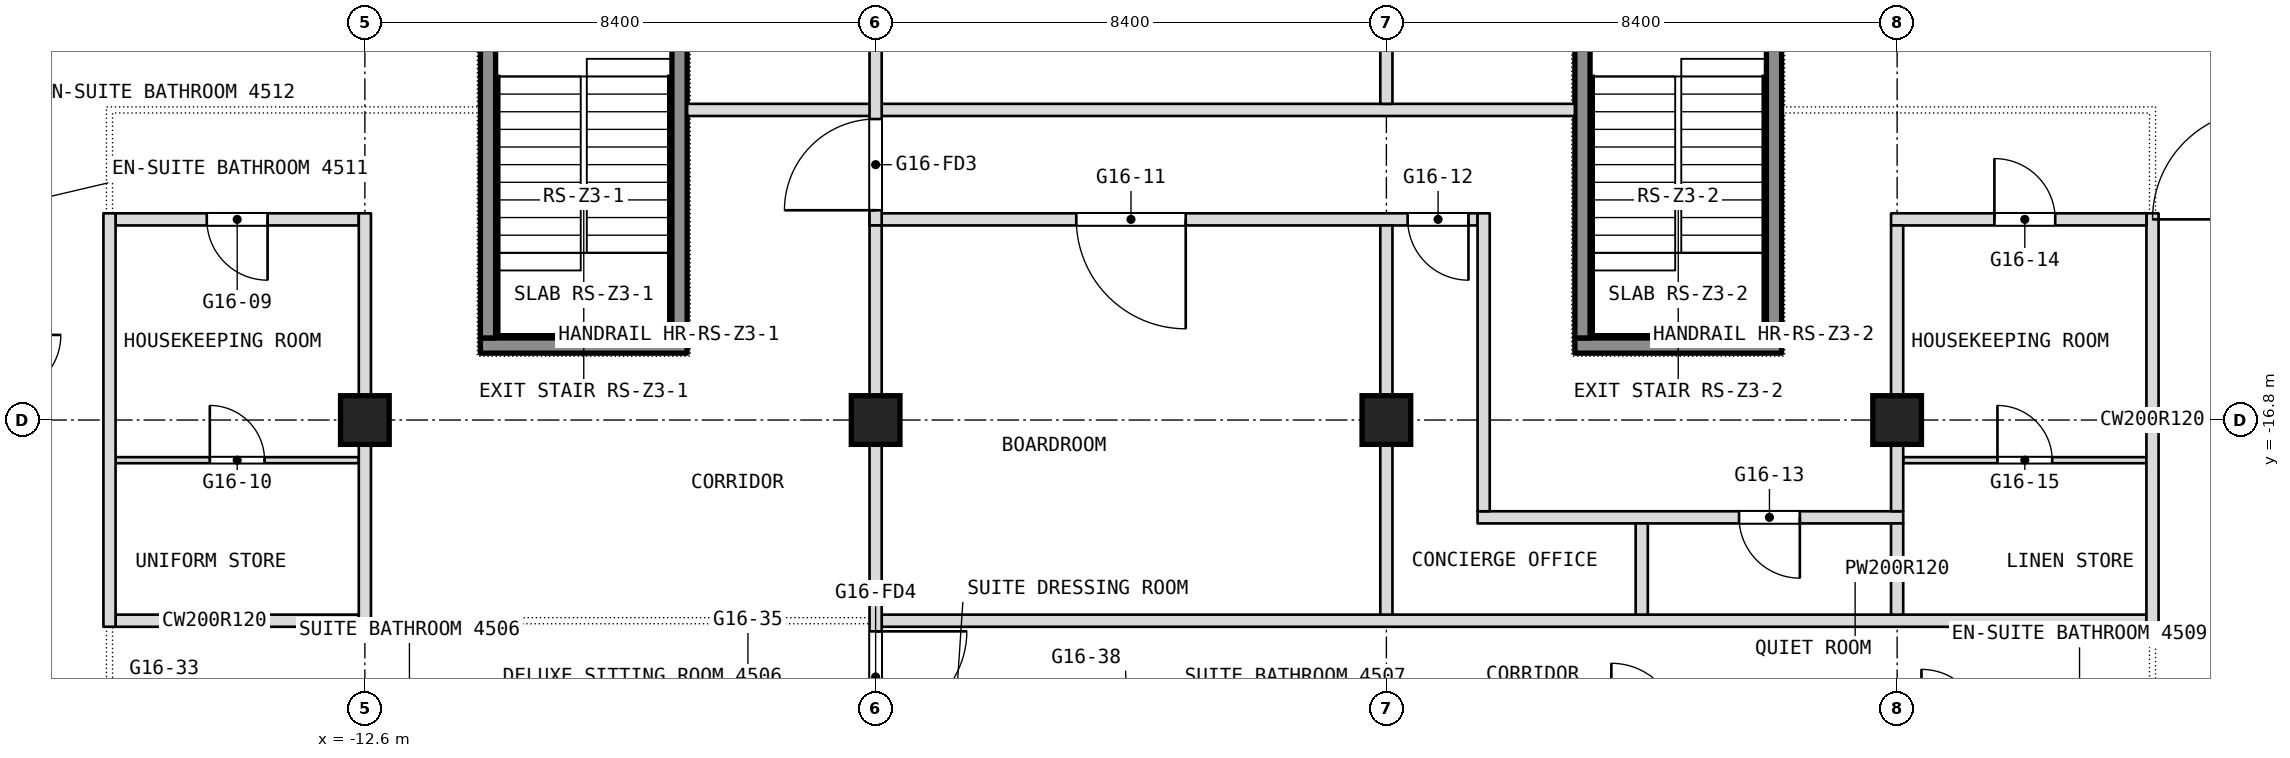
"""IFC4 building model, lengths in metres.
Left out: names, types, materials, properties, quantities, classifications, styles, units other than length and angle.
Written with IfcOpenShell. Run it as: python <this file> out.ifc"""

import sys

from ifc_helpers import new_model, si_unit, direction, frame, frame_2d, origin, origin_2d, place, context, subcontext, project, spatial, rectangle, extrude, element, fill, save


model = new_model("IFC4")
c1 = context("Model", 3, precision=1e-05, world=origin(), true_north=direction((0.0, 1.0)))
c2 = subcontext(c1, "Body", "Model", "MODEL_VIEW")
j1 = project(units=[si_unit("LENGTHUNIT", "METRE"), si_unit("PLANEANGLEUNIT", "RADIAN")], contexts=[c1])
p1 = place(None, origin())
s1 = spatial("IfcSite", under=j1, at=p1, CompositionType="ELEMENT")
p2 = place(p1, origin())
s2 = spatial("IfcBuilding", under=s1, at=p2, CompositionType="ELEMENT")
p3 = place(p2, frame((0.0, 0.0, 198.5)))
s3 = spatial("IfcBuildingStorey", under=s2, at=p3, CompositionType="ELEMENT", Elevation=198.5)
for number, where, z_axis, x_axis in (
    (1, (-12.6, -16.8, 0.0), (0.0, 0.0, 1.0), (1.0, 0.0, 0.0)),
    (2, (-4.2, -16.8, 0.0), (0.0, 0.0, 1.0), (1.0, 0.0, 0.0)),
    (3, (4.2, -16.8, 0.0), (0.0, 0.0, 1.0), (1.0, 0.0, 0.0)),
    (4, (12.6, -16.8, 0.0), (0.0, 0.0, 1.0), (1.0, 0.0, 0.0)),
):
    element("IfcColumn", number, at=place(p3, frame(where, z_axis=z_axis, x_axis=x_axis)), inside=s3, PredefinedType="COLUMN", context=c2, shape_type="SweptSolid", body=[
        extrude(rectangle(XDim=0.8, YDim=0.8, at=origin_2d()), origin(), (0.0, 0.0, 1.0), 3.6),
    ])
p4 = place(p3, frame((-16.7, -20.1, 0.0), z_axis=(0.0, 0.0, 1.0), x_axis=(1.0, 0.0, 0.0)))
e5 = element("IfcWall", 5, at=p4, inside=s3, PredefinedType="PARTITIONING", context=c2, shape_type="SweptSolid", body=[
    extrude(rectangle(XDim=4.0, YDim=0.2, at=frame_2d((2.0, 0.0))), origin(), (0.0, 0.0, 1.0), 3.34),
])
p5 = place(p3, frame((-4.1, -20.1, 0.0), z_axis=(0.0, 0.0, 1.0), x_axis=(1.0, 0.0, 0.0)))
e6 = element("IfcWall", 6, at=p5, inside=s3, PredefinedType="PARTITIONING", context=c2, shape_type="SweptSolid", body=[
    extrude(rectangle(XDim=20.8, YDim=0.2, at=frame_2d((10.4, 0.0))), origin(), (0.0, 0.0, 1.0), 3.34),
])
p6 = place(p3, frame((5.7, -18.4, 0.0), z_axis=(0.0, 0.0, 1.0), x_axis=(1.0, 0.0, 0.0)))
e7 = element("IfcWall", 7, at=p6, inside=s3, PredefinedType="PARTITIONING", context=c2, shape_type="SweptSolid", body=[
    extrude(rectangle(XDim=7.0, YDim=0.2, at=frame_2d((3.5, 0.0))), origin(), (0.0, 0.0, 1.0), 3.34),
])
p7 = place(p6, frame((4.3, 0.0, 0.0)))
e8 = element("IfcOpeningElement", 8, at=p7, cuts=e7, PredefinedType="OPENING", context=c2, shape_type="SweptSolid", body=[
    extrude(rectangle(XDim=1.0, YDim=2.1, at=frame_2d((0.5, 1.05))), frame((0.0, 0.1, 0.0), z_axis=(0.0, -1.0, 0.0), x_axis=(1.0, 0.0, 0.0)), (0.0, 0.0, 1.0), 0.2),
])
p8 = place(p3, frame((-16.7, -17.46, 0.0), z_axis=(0.0, 0.0, 1.0), x_axis=(1.0, 0.0, 0.0)))
e9 = element("IfcWall", 9, at=p8, inside=s3, PredefinedType="PARTITIONING", context=c2, shape_type="SweptSolid", body=[
    extrude(rectangle(XDim=4.0, YDim=0.1, at=frame_2d((2.0, 0.0))), origin(), (0.0, 0.0, 1.0), 3.34),
])
p9 = place(p8, frame((1.55, 0.0, 0.0)))
e10 = element("IfcOpeningElement", 10, at=p9, cuts=e9, PredefinedType="OPENING", context=c2, shape_type="SweptSolid", body=[
    extrude(rectangle(XDim=0.9, YDim=2.1, at=frame_2d((0.45, 1.05))), frame((0.0, 0.05, 0.0), z_axis=(0.0, -1.0, 0.0), x_axis=(1.0, 0.0, 0.0)), (0.0, 0.0, 1.0), 0.1),
])
p10 = place(p3, frame((12.7, -17.46, 0.0), z_axis=(0.0, 0.0, 1.0), x_axis=(1.0, 0.0, 0.0)))
e11 = element("IfcWall", 11, at=p10, inside=s3, PredefinedType="PARTITIONING", context=c2, shape_type="SweptSolid", body=[
    extrude(rectangle(XDim=4.0, YDim=0.1, at=frame_2d((2.0, 0.0))), origin(), (0.0, 0.0, 1.0), 3.34),
])
p11 = place(p10, frame((1.55, 0.0, 0.0)))
e12 = element("IfcOpeningElement", 12, at=p11, cuts=e11, PredefinedType="OPENING", context=c2, shape_type="SweptSolid", body=[
    extrude(rectangle(XDim=0.9, YDim=2.1, at=frame_2d((0.45, 1.05))), frame((0.0, 0.05, 0.0), z_axis=(0.0, -1.0, 0.0), x_axis=(1.0, 0.0, 0.0)), (0.0, 0.0, 1.0), 0.1),
])
p12 = place(p3, frame((16.8, -20.2, 0.0), z_axis=(0.0, 0.0, 1.0), x_axis=(0.0, 1.0, 0.0)))
e13 = element("IfcWall", 13, at=p12, inside=s3, PredefinedType="PARTITIONING", context=c2, shape_type="SweptSolid", body=[
    extrude(rectangle(XDim=6.8, YDim=0.2, at=frame_2d((3.4, 0.0))), origin(), (0.0, 0.0, 1.0), 3.34),
])
p13 = place(p3, frame((-16.7, -13.5, 0.0), z_axis=(0.0, 0.0, 1.0), x_axis=(1.0, 0.0, 0.0)))
e14 = element("IfcWall", 14, at=p13, inside=s3, PredefinedType="PARTITIONING", context=c2, shape_type="SweptSolid", body=[
    extrude(rectangle(XDim=4.0, YDim=0.2, at=frame_2d((2.0, 0.0))), origin(), (0.0, 0.0, 1.0), 3.34),
])
p14 = place(p13, frame((1.5, 0.0, 0.0)))
e15 = element("IfcOpeningElement", 15, at=p14, cuts=e14, PredefinedType="OPENING", context=c2, shape_type="SweptSolid", body=[
    extrude(rectangle(XDim=1.0, YDim=2.1, at=frame_2d((0.5, 1.05))), frame((0.0, 0.1, 0.0), z_axis=(0.0, -1.0, 0.0), x_axis=(1.0, 0.0, 0.0)), (0.0, 0.0, 1.0), 0.2),
])
p15 = place(p3, frame((-4.3, -13.5, 0.0), z_axis=(0.0, 0.0, 1.0), x_axis=(1.0, 0.0, 0.0)))
e16 = element("IfcWall", 16, at=p15, inside=s3, PredefinedType="PARTITIONING", context=c2, shape_type="SweptSolid", body=[
    extrude(rectangle(XDim=10.0, YDim=0.2, at=frame_2d((5.0, 0.0))), origin(), (0.0, 0.0, 1.0), 3.34),
])
p16 = place(p15, frame((3.4, 0.0, 0.0)))
e17 = element("IfcOpeningElement", 17, at=p16, cuts=e16, PredefinedType="OPENING", context=c2, shape_type="SweptSolid", body=[
    extrude(rectangle(XDim=1.8, YDim=2.1, at=frame_2d((0.9, 1.05))), frame((0.0, 0.1, 0.0), z_axis=(0.0, -1.0, 0.0), x_axis=(1.0, 0.0, 0.0)), (0.0, 0.0, 1.0), 0.2),
])
p17 = place(p15, frame((8.85, 0.0, 0.0)))
e18 = element("IfcOpeningElement", 18, at=p17, cuts=e16, PredefinedType="OPENING", context=c2, shape_type="SweptSolid", body=[
    extrude(rectangle(XDim=1.0, YDim=2.1, at=frame_2d((0.5, 1.05))), frame((0.0, 0.1, 0.0), z_axis=(0.0, -1.0, 0.0), x_axis=(1.0, 0.0, 0.0)), (0.0, 0.0, 1.0), 0.2),
])
p18 = place(p3, frame((12.5, -13.5, 0.0), z_axis=(0.0, 0.0, 1.0), x_axis=(1.0, 0.0, 0.0)))
e19 = element("IfcWall", 19, at=p18, inside=s3, PredefinedType="PARTITIONING", context=c2, shape_type="SweptSolid", body=[
    extrude(rectangle(XDim=4.2, YDim=0.2, at=frame_2d((2.1, 0.0))), origin(), (0.0, 0.0, 1.0), 3.34),
])
p19 = place(p18, frame((1.7, 0.0, 0.0)))
e20 = element("IfcOpeningElement", 20, at=p19, cuts=e19, PredefinedType="OPENING", context=c2, shape_type="SweptSolid", body=[
    extrude(rectangle(XDim=1.0, YDim=2.1, at=frame_2d((0.5, 1.05))), frame((0.0, 0.1, 0.0), z_axis=(0.0, -1.0, 0.0), x_axis=(1.0, 0.0, 0.0)), (0.0, 0.0, 1.0), 0.2),
])
p20 = place(p3, frame((12.6, -20.0, 0.0), z_axis=(0.0, 0.0, 1.0), x_axis=(0.0, 1.0, 0.0)))
e21 = element("IfcWall", 21, at=p20, inside=s3, PredefinedType="PARTITIONING", context=c2, shape_type="SweptSolid", body=[
    extrude(rectangle(XDim=1.5, YDim=0.2, at=frame_2d((0.75, 0.0))), origin(), (0.0, 0.0, 1.0), 3.34),
])
p21 = place(p3, frame((12.6, -18.3, 0.0), z_axis=(0.0, 0.0, 1.0), x_axis=(0.0, 1.0, 0.0)))
e22 = element("IfcWall", 22, at=p21, inside=s3, PredefinedType="PARTITIONING", context=c2, shape_type="SweptSolid", body=[
    extrude(rectangle(XDim=4.7, YDim=0.2, at=frame_2d((2.35, 0.0))), origin(), (0.0, 0.0, 1.0), 3.34),
])
p22 = place(p3, frame((-7.3, -11.7, 0.0), z_axis=(0.0, 0.0, 1.0), x_axis=(1.0, 0.0, 0.0)))
e23 = element("IfcWall", 23, at=p22, inside=s3, PredefinedType="PARTITIONING", context=c2, shape_type="SweptSolid", body=[
    extrude(rectangle(XDim=14.6, YDim=0.2, at=frame_2d((7.3, 0.0))), origin(), (0.0, 0.0, 1.0), 3.34),
])
p23 = place(p3, frame((8.4, -20.0, 0.0), z_axis=(0.0, 0.0, 1.0), x_axis=(0.0, 1.0, 0.0)))
e24 = element("IfcWall", 24, at=p23, inside=s3, PredefinedType="PARTITIONING", context=c2, shape_type="SweptSolid", body=[
    extrude(rectangle(XDim=1.5, YDim=0.2, at=frame_2d((0.75, 0.0))), origin(), (0.0, 0.0, 1.0), 3.34),
])
p24 = place(p3, frame((5.8, -18.3, 0.0), z_axis=(0.0, 0.0, 1.0), x_axis=(0.0, 1.0, 0.0)))
e25 = element("IfcWall", 25, at=p24, inside=s3, PredefinedType="PARTITIONING", context=c2, shape_type="SweptSolid", body=[
    extrude(rectangle(XDim=4.9, YDim=0.2, at=frame_2d((2.45, 0.0))), origin(), (0.0, 0.0, 1.0), 3.34),
])
p25 = place(p3, frame((4.2, -20.0, 0.0), z_axis=(0.0, 0.0, 1.0), x_axis=(0.0, 1.0, 0.0)))
e26 = element("IfcWall", 26, at=p25, inside=s3, PredefinedType="PARTITIONING", context=c2, shape_type="SweptSolid", body=[
    extrude(rectangle(XDim=6.4, YDim=0.2, at=frame_2d((3.2, 0.0))), origin(), (0.0, 0.0, 1.0), 3.34),
])
p26 = place(p3, frame((4.2, -11.6, 0.0), z_axis=(0.0, 0.0, 1.0), x_axis=(0.0, 1.0, 0.0)))
e27 = element("IfcWall", 27, at=p26, inside=s3, PredefinedType="PARTITIONING", context=c2, shape_type="SweptSolid", body=[
    extrude(rectangle(XDim=9.7, YDim=0.2, at=frame_2d((4.85, 0.0))), origin(), (0.0, 0.0, 1.0), 3.34),
])
p27 = place(p3, frame((-4.2, -13.6, 0.0), z_axis=(0.0, 0.0, 1.0), x_axis=(0.0, 1.0, 0.0)))
e28 = element("IfcWall", 28, at=p27, inside=s3, PredefinedType="PARTITIONING", context=c2, shape_type="SweptSolid", body=[
    extrude(rectangle(XDim=13.6, YDim=0.2, at=frame_2d((6.8, 0.0))), origin(), (0.0, 0.0, 1.0), 3.34),
])
p28 = place(p27, frame((11.95, 0.0, 0.0)))
e29 = element("IfcOpeningElement", 29, at=p28, cuts=e28, PredefinedType="OPENING", context=c2, shape_type="SweptSolid", body=[
    extrude(rectangle(XDim=1.5, YDim=2.1, at=frame_2d((0.75, 1.05))), frame((0.0, 0.1, 0.0), z_axis=(0.0, -1.0, 0.0), x_axis=(1.0, 0.0, 0.0)), (0.0, 0.0, 1.0), 0.2),
])
p29 = place(p27, frame((0.25, 0.0, 0.0)))
e30 = element("IfcOpeningElement", 30, at=p29, cuts=e28, PredefinedType="OPENING", context=c2, shape_type="SweptSolid", body=[
    extrude(rectangle(XDim=1.5, YDim=2.1, at=frame_2d((0.75, 1.05))), frame((0.0, 0.1, 0.0), z_axis=(0.0, -1.0, 0.0), x_axis=(1.0, 0.0, 0.0)), (0.0, 0.0, 1.0), 0.2),
])
p30 = place(p3, frame((-4.2, -22.0, 0.0), z_axis=(0.0, 0.0, 1.0), x_axis=(0.0, 1.0, 0.0)))
e31 = element("IfcWall", 31, at=p30, inside=s3, PredefinedType="PARTITIONING", context=c2, shape_type="SweptSolid", body=[
    extrude(rectangle(XDim=8.4, YDim=0.2, at=frame_2d((4.2, 0.0))), origin(), (0.0, 0.0, 1.0), 3.34),
])
p31 = place(p30, frame((0.225, 0.0, 0.0)))
e32 = element("IfcOpeningElement", 32, at=p31, cuts=e31, PredefinedType="OPENING", context=c2, shape_type="SweptSolid", body=[
    extrude(rectangle(XDim=1.5, YDim=2.1, at=frame_2d((0.75, 1.05))), frame((0.0, 0.1, 0.0), z_axis=(0.0, -1.0, 0.0), x_axis=(1.0, 0.0, 0.0)), (0.0, 0.0, 1.0), 0.2),
])
for number, where, z_axis, x_axis in (
    (33, (-12.6, -20.2, 0.0), (0.0, 0.0, 1.0), (0.0, 1.0, 0.0)),
    (34, (-16.8, -20.2, 0.0), (0.0, 0.0, 1.0), (0.0, 1.0, 0.0)),
):
    element("IfcWall", number, at=place(p3, frame(where, z_axis=z_axis, x_axis=x_axis)), inside=s3, PredefinedType="PARTITIONING", context=c2, shape_type="SweptSolid", body=[
        extrude(rectangle(XDim=6.8, YDim=0.2, at=frame_2d((3.4, 0.0))), origin(), (0.0, 0.0, 1.0), 3.34),
    ])
p32 = place(p3, frame((-10.7, -15.575, 0.1), z_axis=(0.0, 0.0, 1.0), x_axis=(1.0, 0.0, 0.0)))
e35 = element("IfcWall", 35, at=p32, inside=s3, PredefinedType="SHEAR", context=c2, shape_type="SweptSolid", body=[
    extrude(rectangle(XDim=3.4, YDim=0.25, at=frame_2d((1.7, 0.0))), origin(), (0.0, 0.0, 1.0), 3.6),
])
for number, where, z_axis, x_axis in (
    (36, (-10.575, -15.45, 0.1), (0.0, 0.0, 1.0), (0.0, 1.0, 0.0)),
    (37, (-7.425, -15.45, 0.1), (0.0, 0.0, 1.0), (0.0, 1.0, 0.0)),
):
    element("IfcWall", number, at=place(p3, frame(where, z_axis=z_axis, x_axis=x_axis)), inside=s3, PredefinedType="SHEAR", context=c2, shape_type="SweptSolid", body=[
        extrude(rectangle(XDim=5.7, YDim=0.25, at=frame_2d((2.85, 0.0))), origin(), (0.0, 0.0, 1.0), 3.6),
    ])
p33 = place(p3, frame((7.3, -15.575, 0.1), z_axis=(0.0, 0.0, 1.0), x_axis=(1.0, 0.0, 0.0)))
e38 = element("IfcWall", 38, at=p33, inside=s3, PredefinedType="SHEAR", context=c2, shape_type="SweptSolid", body=[
    extrude(rectangle(XDim=3.4, YDim=0.25, at=frame_2d((1.7, 0.0))), origin(), (0.0, 0.0, 1.0), 3.6),
])
for number, where, z_axis, x_axis in (
    (39, (7.425, -15.45, 0.1), (0.0, 0.0, 1.0), (0.0, 1.0, 0.0)),
    (40, (10.575, -15.45, 0.1), (0.0, 0.0, 1.0), (0.0, 1.0, 0.0)),
):
    element("IfcWall", number, at=place(p3, frame(where, z_axis=z_axis, x_axis=x_axis)), inside=s3, PredefinedType="SHEAR", context=c2, shape_type="SweptSolid", body=[
        extrude(rectangle(XDim=5.7, YDim=0.25, at=frame_2d((2.85, 0.0))), origin(), (0.0, 0.0, 1.0), 3.6),
    ])
p34 = place(p7, origin())
e41 = element("IfcDoor", 41, at=p34, inside=s3, OperationType="SINGLE_SWING_RIGHT", PredefinedType="DOOR", context=c2, shape_type="SweptSolid", body=[
    extrude(rectangle(XDim=1.0, YDim=2.1, at=frame_2d((0.5, 1.05))), frame((0.0, 0.025, 0.0), z_axis=(0.0, -1.0, 0.0), x_axis=(1.0, 0.0, 0.0)), (0.0, 0.0, 1.0), 0.05),
])
fill(e8, e41)
p35 = place(p9, origin())
e42 = element("IfcDoor", 42, at=p35, inside=s3, OperationType="SINGLE_SWING_LEFT", PredefinedType="DOOR", context=c2, shape_type="SweptSolid", body=[
    extrude(rectangle(XDim=0.9, YDim=2.1, at=frame_2d((0.45, 1.05))), frame((0.0, 0.025, 0.0), z_axis=(0.0, -1.0, 0.0), x_axis=(1.0, 0.0, 0.0)), (0.0, 0.0, 1.0), 0.05),
])
fill(e10, e42)
p36 = place(p11, origin())
e43 = element("IfcDoor", 43, at=p36, inside=s3, OperationType="SINGLE_SWING_RIGHT", PredefinedType="DOOR", context=c2, shape_type="SweptSolid", body=[
    extrude(rectangle(XDim=0.9, YDim=2.1, at=frame_2d((0.45, 1.05))), frame((0.0, 0.025, 0.0), z_axis=(0.0, -1.0, 0.0), x_axis=(1.0, 0.0, 0.0)), (0.0, 0.0, 1.0), 0.05),
])
fill(e12, e43)
p37 = place(p14, origin())
e44 = element("IfcDoor", 44, at=p37, inside=s3, OperationType="SINGLE_SWING_LEFT", PredefinedType="DOOR", context=c2, shape_type="SweptSolid", body=[
    extrude(rectangle(XDim=1.0, YDim=2.1, at=frame_2d((0.5, 1.05))), frame((0.0, 0.025, 0.0), z_axis=(0.0, -1.0, 0.0), x_axis=(1.0, 0.0, 0.0)), (0.0, 0.0, 1.0), 0.05),
])
fill(e15, e44)
p38 = place(p16, origin())
e45 = element("IfcDoor", 45, at=p38, inside=s3, OperationType="DOUBLE_DOOR_SINGLE_SWING", PredefinedType="DOOR", context=c2, shape_type="SweptSolid", body=[
    extrude(rectangle(XDim=1.8, YDim=2.1, at=frame_2d((0.9, 1.05))), frame((0.0, 0.025, 0.0), z_axis=(0.0, -1.0, 0.0), x_axis=(1.0, 0.0, 0.0)), (0.0, 0.0, 1.0), 0.05),
])
fill(e17, e45)
p39 = place(p17, origin())
e46 = element("IfcDoor", 46, at=p39, inside=s3, OperationType="SINGLE_SWING_LEFT", PredefinedType="DOOR", context=c2, shape_type="SweptSolid", body=[
    extrude(rectangle(XDim=1.0, YDim=2.1, at=frame_2d((0.5, 1.05))), frame((0.0, 0.025, 0.0), z_axis=(0.0, -1.0, 0.0), x_axis=(1.0, 0.0, 0.0)), (0.0, 0.0, 1.0), 0.05),
])
fill(e18, e46)
p40 = place(p19, origin())
e47 = element("IfcDoor", 47, at=p40, inside=s3, OperationType="SINGLE_SWING_RIGHT", PredefinedType="DOOR", context=c2, shape_type="SweptSolid", body=[
    extrude(rectangle(XDim=1.0, YDim=2.1, at=frame_2d((0.5, 1.05))), frame((0.0, 0.025, 0.0), z_axis=(0.0, -1.0, 0.0), x_axis=(1.0, 0.0, 0.0)), (0.0, 0.0, 1.0), 0.05),
])
fill(e20, e47)
p41 = place(p29, origin())
e48 = element("IfcDoor", 48, at=p41, inside=s3, OperationType="DOUBLE_DOOR_DOUBLE_SWING", PredefinedType="DOOR", context=c2, shape_type="SweptSolid", body=[
    extrude(rectangle(XDim=1.5, YDim=2.1, at=frame_2d((0.75, 1.05))), frame((0.0, 0.025, 0.0), z_axis=(0.0, -1.0, 0.0), x_axis=(1.0, 0.0, 0.0)), (0.0, 0.0, 1.0), 0.05),
])
fill(e30, e48)
p42 = place(p31, origin())
e49 = element("IfcDoor", 49, at=p42, inside=s3, OperationType="DOUBLE_DOOR_DOUBLE_SWING", PredefinedType="DOOR", context=c2, shape_type="SweptSolid", body=[
    extrude(rectangle(XDim=1.5, YDim=2.1, at=frame_2d((0.75, 1.05))), frame((0.0, 0.025, 0.0), z_axis=(0.0, -1.0, 0.0), x_axis=(1.0, 0.0, 0.0)), (0.0, 0.0, 1.0), 0.05),
])
fill(e32, e49)
save(model, sys.argv[1])
